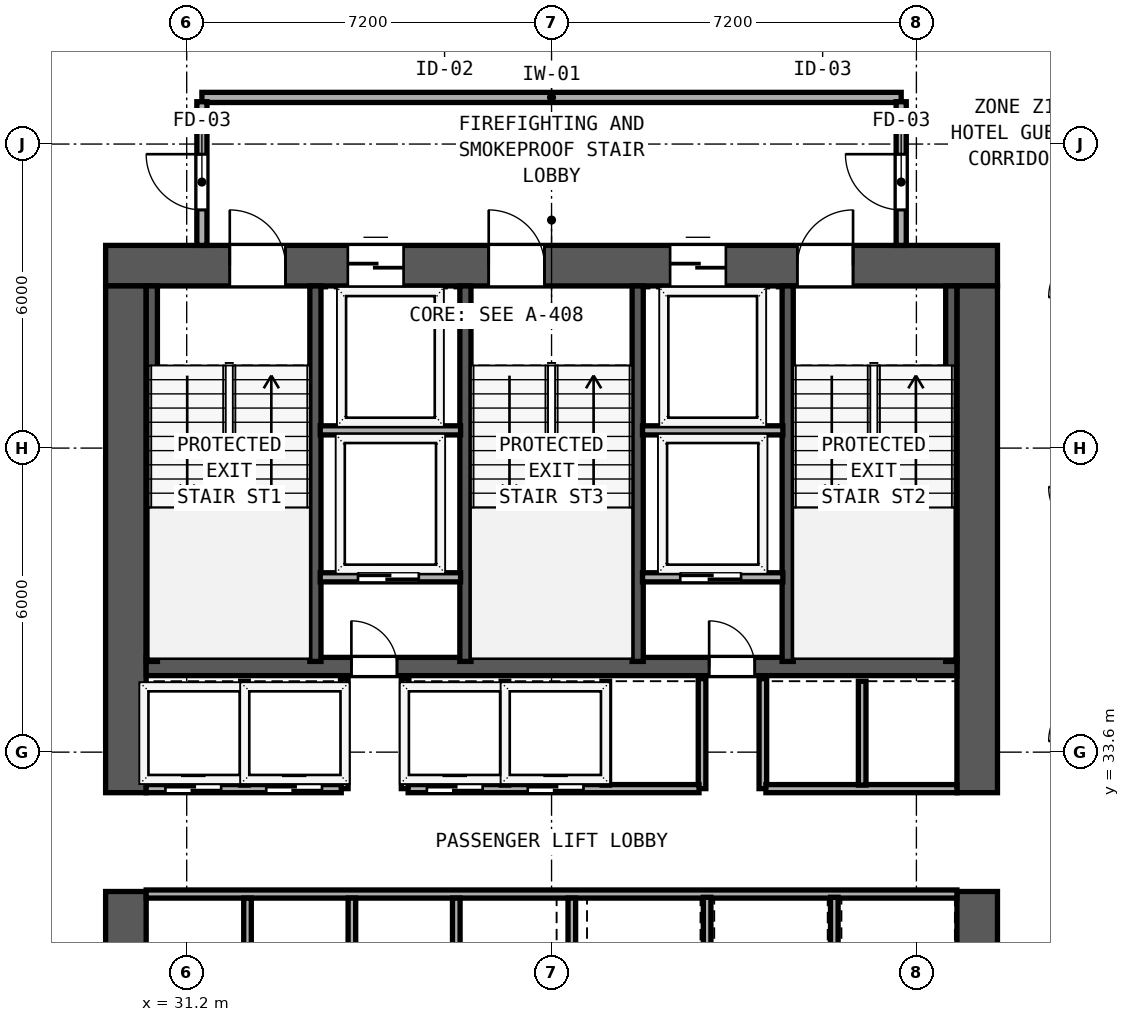
"""IFC4 building model, lengths in metres.
Left out: names, types, materials, properties, quantities, classifications, styles, units other than length and angle.
Written with IfcOpenShell. Run it as: python <this file> out.ifc"""

import sys

from ifc_helpers import new_model, si_unit, direction, frame, frame_2d, origin, place, context, subcontext, project, spatial, rectangle, extrude, element, fill, save


model = new_model("IFC4")
c1 = context("Model", 3, precision=1e-05, world=origin(), true_north=direction((0.0, 1.0)))
c2 = subcontext(c1, "Body", "Model", "MODEL_VIEW")
j1 = project(units=[si_unit("LENGTHUNIT", "METRE"), si_unit("PLANEANGLEUNIT", "RADIAN")], contexts=[c1])
p1 = place(None, origin())
s1 = spatial("IfcSite", under=j1, at=p1, CompositionType="ELEMENT")
p2 = place(p1, origin())
s2 = spatial("IfcBuilding", under=s1, at=p2, CompositionType="ELEMENT")
p3 = place(p2, frame((0.0, 0.0, 81.8)))
s3 = spatial("IfcBuildingStorey", under=s2, at=p3, CompositionType="ELEMENT", Elevation=81.8)
p4 = place(p3, frame((29.6, 43.2, 0.0), z_axis=(0.0, 0.0, 1.0), x_axis=(1.0, 0.0, 0.0)))
e1 = element("IfcWall", 1, at=p4, inside=s3, PredefinedType="SHEAR", context=c2, shape_type="SweptSolid", body=[
    extrude(rectangle(XDim=17.6, YDim=0.8, at=frame_2d((8.8, 0.0))), origin(), (0.0, 0.0, 1.0), 3.6),
])
p5 = place(p4, frame((2.45, 0.0, 0.0)))
e2 = element("IfcOpeningElement", 2, at=p5, cuts=e1, PredefinedType="OPENING", context=c2, shape_type="SweptSolid", body=[
    extrude(rectangle(XDim=1.1, YDim=2.15, at=frame_2d((0.55, 1.075))), frame((0.0, 0.41, 0.0), z_axis=(0.0, -1.0, 0.0), x_axis=(1.0, 0.0, 0.0)), (0.0, 0.0, 1.0), 0.82),
])
p6 = place(p4, frame((7.56, 0.0, 0.0)))
e3 = element("IfcOpeningElement", 3, at=p6, cuts=e1, PredefinedType="OPENING", context=c2, shape_type="SweptSolid", body=[
    extrude(rectangle(XDim=1.1, YDim=2.15, at=frame_2d((0.55, 1.075))), frame((0.0, 0.41, 0.0), z_axis=(0.0, -1.0, 0.0), x_axis=(1.0, 0.0, 0.0)), (0.0, 0.0, 1.0), 0.82),
])
p7 = place(p4, frame((13.65, 0.0, 0.0)))
e4 = element("IfcOpeningElement", 4, at=p7, cuts=e1, PredefinedType="OPENING", context=c2, shape_type="SweptSolid", body=[
    extrude(rectangle(XDim=1.1, YDim=2.15, at=frame_2d((0.55, 1.075))), frame((0.0, 0.41, 0.0), z_axis=(0.0, -1.0, 0.0), x_axis=(1.0, 0.0, 0.0)), (0.0, 0.0, 1.0), 0.82),
])
p8 = place(p4, frame((4.78, 0.0, 0.0)))
e5 = element("IfcOpeningElement", 5, at=p8, cuts=e1, PredefinedType="OPENING", context=c2, shape_type="SweptSolid", body=[
    extrude(rectangle(XDim=1.1, YDim=2.2, at=frame_2d((0.55, 1.1))), frame((0.0, 0.41, 0.0), z_axis=(0.0, -1.0, 0.0), x_axis=(1.0, 0.0, 0.0)), (0.0, 0.0, 1.0), 0.82),
])
p9 = place(p4, frame((11.14, 0.0, 0.0)))
e6 = element("IfcOpeningElement", 6, at=p9, cuts=e1, PredefinedType="OPENING", context=c2, shape_type="SweptSolid", body=[
    extrude(rectangle(XDim=1.1, YDim=2.2, at=frame_2d((0.55, 1.1))), frame((0.0, 0.41, 0.0), z_axis=(0.0, -1.0, 0.0), x_axis=(1.0, 0.0, 0.0)), (0.0, 0.0, 1.0), 0.82),
])
p10 = place(p3, frame((30.0, 26.8, 0.0), z_axis=(0.0, 0.0, 1.0), x_axis=(0.0, 1.0, 0.0)))
e7 = element("IfcWall", 7, at=p10, inside=s3, PredefinedType="SHEAR", context=c2, shape_type="SweptSolid", body=[
    extrude(rectangle(XDim=4.05, YDim=0.8, at=frame_2d((2.025, 0.0))), origin(), (0.0, 0.0, 1.0), 3.6),
])
p11 = place(p3, frame((30.0, 32.8, 0.0), z_axis=(0.0, 0.0, 1.0), x_axis=(0.0, 1.0, 0.0)))
e8 = element("IfcWall", 8, at=p11, inside=s3, PredefinedType="SHEAR", context=c2, shape_type="SweptSolid", body=[
    extrude(rectangle(XDim=10.0, YDim=0.8, at=frame_2d((5.0, 0.0))), origin(), (0.0, 0.0, 1.0), 3.6),
])
p12 = place(p3, frame((46.8, 26.8, 0.0), z_axis=(0.0, 0.0, 1.0), x_axis=(0.0, 1.0, 0.0)))
e9 = element("IfcWall", 9, at=p12, inside=s3, PredefinedType="SHEAR", context=c2, shape_type="SweptSolid", body=[
    extrude(rectangle(XDim=4.05, YDim=0.8, at=frame_2d((2.025, 0.0))), origin(), (0.0, 0.0, 1.0), 3.6),
])
p13 = place(p3, frame((46.8, 32.8, 0.0), z_axis=(0.0, 0.0, 1.0), x_axis=(0.0, 1.0, 0.0)))
e10 = element("IfcWall", 10, at=p13, inside=s3, PredefinedType="SHEAR", context=c2, shape_type="SweptSolid", body=[
    extrude(rectangle(XDim=10.0, YDim=0.8, at=frame_2d((5.0, 0.0))), origin(), (0.0, 0.0, 1.0), 3.6),
])
p14 = place(p3, frame((30.4, 35.29, 0.0), z_axis=(0.0, 0.0, 1.0), x_axis=(1.0, 0.0, 0.0)))
e11 = element("IfcWall", 11, at=p14, inside=s3, PredefinedType="SHEAR", context=c2, shape_type="SweptSolid", body=[
    extrude(rectangle(XDim=16.0, YDim=0.36, at=frame_2d((8.0, 0.0))), origin(), (0.0, 0.0, 1.0), 3.6),
])
p15 = place(p14, frame((4.95, 0.0, 0.0), z_axis=(0.0, 0.0, 1.0), x_axis=(-1.0, 0.0, 0.0)))
e12 = element("IfcOpeningElement", 12, at=p15, cuts=e11, PredefinedType="OPENING", context=c2, shape_type="SweptSolid", body=[
    extrude(rectangle(XDim=0.9, YDim=2.1, at=frame_2d((0.45, 1.05))), frame((0.0, 0.19, 0.0), z_axis=(0.0, -1.0, 0.0), x_axis=(1.0, 0.0, 0.0)), (0.0, 0.0, 1.0), 0.38),
])
p16 = place(p14, frame((12.01, 0.0, 0.0), z_axis=(0.0, 0.0, 1.0), x_axis=(-1.0, 0.0, 0.0)))
e13 = element("IfcOpeningElement", 13, at=p16, cuts=e11, PredefinedType="OPENING", context=c2, shape_type="SweptSolid", body=[
    extrude(rectangle(XDim=0.9, YDim=2.1, at=frame_2d((0.45, 1.05))), frame((0.0, 0.19, 0.0), z_axis=(0.0, -1.0, 0.0), x_axis=(1.0, 0.0, 0.0)), (0.0, 0.0, 1.0), 0.38),
])
for number, where, z_axis, x_axis in (
    (14, (30.512, 35.39, 0.0), (0.0, 0.0, 1.0), (0.0, 1.0, 0.0)),
    (15, (33.74, 35.39, 0.0), (0.0, 0.0, 1.0), (0.0, 1.0, 0.0)),
    (16, (36.7, 35.39, 0.0), (0.0, 0.0, 1.0), (0.0, 1.0, 0.0)),
    (17, (40.1, 35.39, 0.0), (0.0, 0.0, 1.0), (0.0, 1.0, 0.0)),
    (18, (43.06, 35.39, 0.0), (0.0, 0.0, 1.0), (0.0, 1.0, 0.0)),
    (19, (46.288, 35.39, 0.0), (0.0, 0.0, 1.0), (0.0, 1.0, 0.0)),
):
    element("IfcWall", number, at=place(p3, frame(where, z_axis=z_axis, x_axis=x_axis)), inside=s3, PredefinedType="SHEAR", context=c2, shape_type="SweptSolid", body=[
        extrude(rectangle(XDim=7.41, YDim=0.22, at=frame_2d((3.705, 0.0))), origin(), (0.0, 0.0, 1.0), 3.6),
    ])
p17 = place(p3, frame((31.5, 46.52, 0.0), z_axis=(0.0, 0.0, 1.0), x_axis=(1.0, 0.0, 0.0)))
e20 = element("IfcWall", 20, at=p17, inside=s3, PredefinedType="SOLIDWALL", context=c2, shape_type="SweptSolid", body=[
    extrude(rectangle(XDim=13.8, YDim=0.2, at=frame_2d((6.9, 0.0))), origin(), (0.0, 0.0, 1.0), 3.6),
])
p18 = place(p3, frame((31.5, 43.6, 0.0), z_axis=(0.0, 0.0, 1.0), x_axis=(0.0, 1.0, 0.0)))
e21 = element("IfcWall", 21, at=p18, inside=s3, PredefinedType="SOLIDWALL", context=c2, shape_type="SweptSolid", body=[
    extrude(rectangle(XDim=2.835, YDim=0.2, at=frame_2d((1.417, 0.0))), origin(), (0.0, 0.0, 1.0), 3.6),
])
p19 = place(p18, frame((1.8, 0.0, 0.0), z_axis=(0.0, 0.0, 1.0), x_axis=(-1.0, 0.0, 0.0)))
e22 = element("IfcOpeningElement", 22, at=p19, cuts=e21, PredefinedType="OPENING", context=c2, shape_type="SweptSolid", body=[
    extrude(rectangle(XDim=1.1, YDim=2.15, at=frame_2d((0.55, 1.075))), frame((0.0, 0.11, 0.0), z_axis=(0.0, -1.0, 0.0), x_axis=(1.0, 0.0, 0.0)), (0.0, 0.0, 1.0), 0.22),
])
p20 = place(p3, frame((45.3, 43.6, 0.0), z_axis=(0.0, 0.0, 1.0), x_axis=(0.0, 1.0, 0.0)))
e23 = element("IfcWall", 23, at=p20, inside=s3, PredefinedType="SOLIDWALL", context=c2, shape_type="SweptSolid", body=[
    extrude(rectangle(XDim=2.835, YDim=0.2, at=frame_2d((1.417, 0.0))), origin(), (0.0, 0.0, 1.0), 3.6),
])
p21 = place(p20, frame((0.7, 0.0, 0.0)))
e24 = element("IfcOpeningElement", 24, at=p21, cuts=e23, PredefinedType="OPENING", context=c2, shape_type="SweptSolid", body=[
    extrude(rectangle(XDim=1.1, YDim=2.15, at=frame_2d((0.55, 1.075))), frame((0.0, 0.11, 0.0), z_axis=(0.0, -1.0, 0.0), x_axis=(1.0, 0.0, 0.0)), (0.0, 0.0, 1.0), 0.22),
])
for number, where, z_axis, x_axis in (
    (25, (33.835, 39.95, 0.0), (0.0, 0.0, 1.0), (1.0, 0.0, 0.0)),
    (26, (40.195, 39.95, 0.0), (0.0, 0.0, 1.0), (1.0, 0.0, 0.0)),
):
    element("IfcWall", number, at=place(p3, frame(where, z_axis=z_axis, x_axis=x_axis)), inside=s3, PredefinedType="SOLIDWALL", context=c2, shape_type="SweptSolid", body=[
        extrude(rectangle(XDim=2.77, YDim=0.18, at=frame_2d((1.385, 0.0))), origin(), (0.0, 0.0, 1.0), 3.6),
    ])
p22 = place(p3, frame((33.835, 37.05, 0.0), z_axis=(0.0, 0.0, 1.0), x_axis=(1.0, 0.0, 0.0)))
e27 = element("IfcWall", 27, at=p22, inside=s3, PredefinedType="SOLIDWALL", context=c2, shape_type="SweptSolid", body=[
    extrude(rectangle(XDim=2.77, YDim=0.18, at=frame_2d((1.385, 0.0))), origin(), (0.0, 0.0, 1.0), 3.6),
])
p23 = place(p22, frame((1.945, 0.0, 0.0), z_axis=(0.0, 0.0, 1.0), x_axis=(-1.0, 0.0, 0.0)))
e28 = element("IfcOpeningElement", 28, at=p23, cuts=e27, PredefinedType="OPENING", context=c2, shape_type="SweptSolid", body=[
    extrude(rectangle(XDim=1.2, YDim=2.2, at=frame_2d((0.6, 1.1))), frame((0.0, 0.1, 0.0), z_axis=(0.0, -1.0, 0.0), x_axis=(1.0, 0.0, 0.0)), (0.0, 0.0, 1.0), 0.2),
])
for number, where, z_axis, x_axis in (
    (29, (34.31, 32.88, 0.0), (0.0, 0.0, 1.0), (0.0, 1.0, 0.0)),
    (30, (35.51, 32.88, 0.0), (0.0, 0.0, 1.0), (0.0, 1.0, 0.0)),
):
    element("IfcWall", number, at=place(p3, frame(where, z_axis=z_axis, x_axis=x_axis)), inside=s3, PredefinedType="SOLIDWALL", context=c2, shape_type="SweptSolid", body=[
        extrude(rectangle(XDim=2.17, YDim=0.15, at=frame_2d((1.085, 0.0))), origin(), (0.0, 0.0, 1.0), 3.6),
    ])
p24 = place(p3, frame((40.195, 37.05, 0.0), z_axis=(0.0, 0.0, 1.0), x_axis=(1.0, 0.0, 0.0)))
e31 = element("IfcWall", 31, at=p24, inside=s3, PredefinedType="SOLIDWALL", context=c2, shape_type="SweptSolid", body=[
    extrude(rectangle(XDim=2.77, YDim=0.18, at=frame_2d((1.385, 0.0))), origin(), (0.0, 0.0, 1.0), 3.6),
])
p25 = place(p24, frame((1.945, 0.0, 0.0), z_axis=(0.0, 0.0, 1.0), x_axis=(-1.0, 0.0, 0.0)))
e32 = element("IfcOpeningElement", 32, at=p25, cuts=e31, PredefinedType="OPENING", context=c2, shape_type="SweptSolid", body=[
    extrude(rectangle(XDim=1.2, YDim=2.2, at=frame_2d((0.6, 1.1))), frame((0.0, 0.1, 0.0), z_axis=(0.0, -1.0, 0.0), x_axis=(1.0, 0.0, 0.0)), (0.0, 0.0, 1.0), 0.2),
])
for number, where, z_axis, x_axis in (
    (33, (41.37, 32.88, 0.0), (0.0, 0.0, 1.0), (0.0, 1.0, 0.0)),
    (34, (42.57, 32.88, 0.0), (0.0, 0.0, 1.0), (0.0, 1.0, 0.0)),
):
    element("IfcWall", number, at=place(p3, frame(where, z_axis=z_axis, x_axis=x_axis)), inside=s3, PredefinedType="SOLIDWALL", context=c2, shape_type="SweptSolid", body=[
        extrude(rectangle(XDim=2.17, YDim=0.15, at=frame_2d((1.085, 0.0))), origin(), (0.0, 0.0, 1.0), 3.6),
    ])
p26 = place(p3, frame((30.4, 32.88, 0.0), z_axis=(0.0, 0.0, 1.0), x_axis=(1.0, 0.0, 0.0)))
e35 = element("IfcWall", 35, at=p26, inside=s3, PredefinedType="SOLIDWALL", context=c2, shape_type="SweptSolid", body=[
    extrude(rectangle(XDim=3.85, YDim=0.16, at=frame_2d((1.925, 0.0))), origin(), (0.0, 0.0, 1.0), 3.6),
])
p27 = place(p26, frame((1.48, 0.0, 0.0), z_axis=(0.0, 0.0, 1.0), x_axis=(-1.0, 0.0, 0.0)))
e36 = element("IfcOpeningElement", 36, at=p27, cuts=e35, PredefinedType="OPENING", context=c2, shape_type="SweptSolid", body=[
    extrude(rectangle(XDim=1.1, YDim=2.2, at=frame_2d((0.55, 1.1))), frame((0.0, 0.09, 0.0), z_axis=(0.0, -1.0, 0.0), x_axis=(1.0, 0.0, 0.0)), (0.0, 0.0, 1.0), 0.18),
])
p28 = place(p26, frame((3.47, 0.0, 0.0), z_axis=(0.0, 0.0, 1.0), x_axis=(-1.0, 0.0, 0.0)))
e37 = element("IfcOpeningElement", 37, at=p28, cuts=e35, PredefinedType="OPENING", context=c2, shape_type="SweptSolid", body=[
    extrude(rectangle(XDim=1.1, YDim=2.2, at=frame_2d((0.55, 1.1))), frame((0.0, 0.09, 0.0), z_axis=(0.0, -1.0, 0.0), x_axis=(1.0, 0.0, 0.0)), (0.0, 0.0, 1.0), 0.18),
])
p29 = place(p3, frame((35.57, 32.88, 0.0), z_axis=(0.0, 0.0, 1.0), x_axis=(1.0, 0.0, 0.0)))
e38 = element("IfcWall", 38, at=p29, inside=s3, PredefinedType="SOLIDWALL", context=c2, shape_type="SweptSolid", body=[
    extrude(rectangle(XDim=5.74, YDim=0.16, at=frame_2d((2.87, 0.0))), origin(), (0.0, 0.0, 1.0), 3.6),
])
p30 = place(p29, frame((1.47, 0.0, 0.0), z_axis=(0.0, 0.0, 1.0), x_axis=(-1.0, 0.0, 0.0)))
e39 = element("IfcOpeningElement", 39, at=p30, cuts=e38, PredefinedType="OPENING", context=c2, shape_type="SweptSolid", body=[
    extrude(rectangle(XDim=1.1, YDim=2.2, at=frame_2d((0.55, 1.1))), frame((0.0, 0.09, 0.0), z_axis=(0.0, -1.0, 0.0), x_axis=(1.0, 0.0, 0.0)), (0.0, 0.0, 1.0), 0.18),
])
p31 = place(p29, frame((3.46, 0.0, 0.0), z_axis=(0.0, 0.0, 1.0), x_axis=(-1.0, 0.0, 0.0)))
e40 = element("IfcOpeningElement", 40, at=p31, cuts=e38, PredefinedType="OPENING", context=c2, shape_type="SweptSolid", body=[
    extrude(rectangle(XDim=1.1, YDim=2.2, at=frame_2d((0.55, 1.1))), frame((0.0, 0.09, 0.0), z_axis=(0.0, -1.0, 0.0), x_axis=(1.0, 0.0, 0.0)), (0.0, 0.0, 1.0), 0.18),
])
p32 = place(p3, frame((42.63, 32.88, 0.0), z_axis=(0.0, 0.0, 1.0), x_axis=(1.0, 0.0, 0.0)))
e41 = element("IfcWall", 41, at=p32, inside=s3, PredefinedType="SOLIDWALL", context=c2, shape_type="SweptSolid", body=[
    extrude(rectangle(XDim=3.77, YDim=0.16, at=frame_2d((1.885, 0.0))), origin(), (0.0, 0.0, 1.0), 3.6),
])
for number, where, z_axis, x_axis in (
    (42, (32.34, 32.95, 0.0), (0.0, 0.0, 1.0), (0.0, 1.0, 0.0)),
    (43, (37.48, 32.95, 0.0), (0.0, 0.0, 1.0), (0.0, 1.0, 0.0)),
    (44, (39.47, 32.95, 0.0), (0.0, 0.0, 1.0), (0.0, 1.0, 0.0)),
    (45, (44.53, 32.95, 0.0), (0.0, 0.0, 1.0), (0.0, 1.0, 0.0)),
):
    element("IfcWall", number, at=place(p3, frame(where, z_axis=z_axis, x_axis=x_axis)), inside=s3, PredefinedType="SOLIDWALL", context=c2, shape_type="SweptSolid", body=[
        extrude(rectangle(XDim=2.05, YDim=0.15, at=frame_2d((1.025, 0.0))), origin(), (0.0, 0.0, 1.0), 3.6),
    ])
p33 = place(p3, frame((30.4, 30.8, 0.0), z_axis=(0.0, 0.0, 1.0), x_axis=(1.0, 0.0, 0.0)))
e46 = element("IfcWall", 46, at=p33, inside=s3, PredefinedType="SOLIDWALL", context=c2, shape_type="SweptSolid", body=[
    extrude(rectangle(XDim=16.0, YDim=0.16, at=frame_2d((8.0, 0.0))), origin(), (0.0, 0.0, 1.0), 3.6),
])
for number, where, z_axis, x_axis in (
    (47, (32.4, 28.735, 0.0), (0.0, 0.0, 1.0), (0.0, 1.0, 0.0)),
    (48, (34.46, 28.735, 0.0), (0.0, 0.0, 1.0), (0.0, 1.0, 0.0)),
    (49, (36.52, 28.735, 0.0), (0.0, 0.0, 1.0), (0.0, 1.0, 0.0)),
    (50, (38.8, 28.735, 0.0), (0.0, 0.0, 1.0), (0.0, 1.0, 0.0)),
):
    element("IfcWall", number, at=place(p3, frame(where, z_axis=z_axis, x_axis=x_axis)), inside=s3, PredefinedType="SOLIDWALL", context=c2, shape_type="SweptSolid", body=[
        extrude(rectangle(XDim=1.985, YDim=0.15, at=frame_2d((0.992, 0.0))), origin(), (0.0, 0.0, 1.0), 3.6),
    ])
for number, where, z_axis, x_axis in (
    (51, (41.47, 28.75, 0.0), (0.0, 0.0, 1.0), (0.0, 1.0, 0.0)),
    (52, (43.98, 28.75, 0.0), (0.0, 0.0, 1.0), (0.0, 1.0, 0.0)),
):
    element("IfcWall", number, at=place(p3, frame(where, z_axis=z_axis, x_axis=x_axis)), inside=s3, PredefinedType="SOLIDWALL", context=c2, shape_type="SweptSolid", body=[
        extrude(rectangle(XDim=1.985, YDim=0.15, at=frame_2d((0.993, 0.0))), origin(), (0.0, 0.0, 1.0), 3.6),
    ])
p34 = place(p5, origin())
e53 = element("IfcDoor", 53, at=p34, inside=s3, OperationType="SINGLE_SWING_LEFT", PredefinedType="DOOR", context=c2, shape_type="SweptSolid", body=[
    extrude(rectangle(XDim=1.1, YDim=2.15, at=frame_2d((0.55, 1.075))), frame((0.0, 0.185, 0.0), z_axis=(0.0, -1.0, 0.0), x_axis=(1.0, 0.0, 0.0)), (0.0, 0.0, 1.0), 0.05),
])
fill(e2, e53)
p35 = place(p6, origin())
e54 = element("IfcDoor", 54, at=p35, inside=s3, OperationType="SINGLE_SWING_LEFT", PredefinedType="DOOR", context=c2, shape_type="SweptSolid", body=[
    extrude(rectangle(XDim=1.1, YDim=2.15, at=frame_2d((0.55, 1.075))), frame((0.0, 0.185, 0.0), z_axis=(0.0, -1.0, 0.0), x_axis=(1.0, 0.0, 0.0)), (0.0, 0.0, 1.0), 0.05),
])
fill(e3, e54)
p36 = place(p7, origin())
e55 = element("IfcDoor", 55, at=p36, inside=s3, OperationType="SINGLE_SWING_RIGHT", PredefinedType="DOOR", context=c2, shape_type="SweptSolid", body=[
    extrude(rectangle(XDim=1.1, YDim=2.15, at=frame_2d((0.55, 1.075))), frame((0.0, 0.185, 0.0), z_axis=(0.0, -1.0, 0.0), x_axis=(1.0, 0.0, 0.0)), (0.0, 0.0, 1.0), 0.05),
])
fill(e4, e55)
p37 = place(p19, origin())
e56 = element("IfcDoor", 56, at=p37, inside=s3, OperationType="SINGLE_SWING_LEFT", PredefinedType="DOOR", context=c2, shape_type="SweptSolid", body=[
    extrude(rectangle(XDim=1.1, YDim=2.15, at=frame_2d((0.55, 1.075))), frame((0.0, 0.025, 0.0), z_axis=(0.0, -1.0, 0.0), x_axis=(1.0, 0.0, 0.0)), (0.0, 0.0, 1.0), 0.05),
])
fill(e22, e56)
p38 = place(p21, origin())
e57 = element("IfcDoor", 57, at=p38, inside=s3, OperationType="SINGLE_SWING_RIGHT", PredefinedType="DOOR", context=c2, shape_type="SweptSolid", body=[
    extrude(rectangle(XDim=1.1, YDim=2.15, at=frame_2d((0.55, 1.075))), frame((0.0, 0.025, 0.0), z_axis=(0.0, -1.0, 0.0), x_axis=(1.0, 0.0, 0.0)), (0.0, 0.0, 1.0), 0.05),
])
fill(e24, e57)
p39 = place(p8, origin())
e58 = element("IfcDoor", 58, at=p39, inside=s3, OperationType="SLIDING_TO_LEFT", PredefinedType="DOOR", context=c2, shape_type="SweptSolid", body=[
    extrude(rectangle(XDim=1.1, YDim=2.2, at=frame_2d((0.55, 1.1))), frame((0.0, 0.185, 0.0), z_axis=(0.0, -1.0, 0.0), x_axis=(1.0, 0.0, 0.0)), (0.0, 0.0, 1.0), 0.05),
])
fill(e5, e58)
p40 = place(p9, origin())
e59 = element("IfcDoor", 59, at=p40, inside=s3, OperationType="SLIDING_TO_LEFT", PredefinedType="DOOR", context=c2, shape_type="SweptSolid", body=[
    extrude(rectangle(XDim=1.1, YDim=2.2, at=frame_2d((0.55, 1.1))), frame((0.0, 0.185, 0.0), z_axis=(0.0, -1.0, 0.0), x_axis=(1.0, 0.0, 0.0)), (0.0, 0.0, 1.0), 0.05),
])
fill(e6, e59)
p41 = place(p23, origin())
e60 = element("IfcDoor", 60, at=p41, inside=s3, OperationType="SLIDING_TO_RIGHT", PredefinedType="DOOR", context=c2, shape_type="SweptSolid", body=[
    extrude(rectangle(XDim=1.2, YDim=2.2, at=frame_2d((0.6, 1.1))), frame((0.0, 0.025, 0.0), z_axis=(0.0, -1.0, 0.0), x_axis=(1.0, 0.0, 0.0)), (0.0, 0.0, 1.0), 0.05),
])
fill(e28, e60)
p42 = place(p15, origin())
e61 = element("IfcDoor", 61, at=p42, inside=s3, OperationType="SINGLE_SWING_RIGHT", PredefinedType="DOOR", context=c2, shape_type="SweptSolid", body=[
    extrude(rectangle(XDim=0.9, YDim=2.1, at=frame_2d((0.45, 1.05))), frame((0.0, 0.025, 0.0), z_axis=(0.0, -1.0, 0.0), x_axis=(1.0, 0.0, 0.0)), (0.0, 0.0, 1.0), 0.05),
])
fill(e12, e61)
p43 = place(p25, origin())
e62 = element("IfcDoor", 62, at=p43, inside=s3, OperationType="SLIDING_TO_RIGHT", PredefinedType="DOOR", context=c2, shape_type="SweptSolid", body=[
    extrude(rectangle(XDim=1.2, YDim=2.2, at=frame_2d((0.6, 1.1))), frame((0.0, 0.025, 0.0), z_axis=(0.0, -1.0, 0.0), x_axis=(1.0, 0.0, 0.0)), (0.0, 0.0, 1.0), 0.05),
])
fill(e32, e62)
p44 = place(p16, origin())
e63 = element("IfcDoor", 63, at=p44, inside=s3, OperationType="SINGLE_SWING_RIGHT", PredefinedType="DOOR", context=c2, shape_type="SweptSolid", body=[
    extrude(rectangle(XDim=0.9, YDim=2.1, at=frame_2d((0.45, 1.05))), frame((0.0, 0.025, 0.0), z_axis=(0.0, -1.0, 0.0), x_axis=(1.0, 0.0, 0.0)), (0.0, 0.0, 1.0), 0.05),
])
fill(e13, e63)
p45 = place(p27, origin())
e64 = element("IfcDoor", 64, at=p45, inside=s3, OperationType="SLIDING_TO_LEFT", PredefinedType="DOOR", context=c2, shape_type="SweptSolid", body=[
    extrude(rectangle(XDim=1.1, YDim=2.2, at=frame_2d((0.55, 1.1))), frame((0.0, 0.025, 0.0), z_axis=(0.0, -1.0, 0.0), x_axis=(1.0, 0.0, 0.0)), (0.0, 0.0, 1.0), 0.05),
])
fill(e36, e64)
p46 = place(p28, origin())
e65 = element("IfcDoor", 65, at=p46, inside=s3, OperationType="SLIDING_TO_LEFT", PredefinedType="DOOR", context=c2, shape_type="SweptSolid", body=[
    extrude(rectangle(XDim=1.1, YDim=2.2, at=frame_2d((0.55, 1.1))), frame((0.0, 0.025, 0.0), z_axis=(0.0, -1.0, 0.0), x_axis=(1.0, 0.0, 0.0)), (0.0, 0.0, 1.0), 0.05),
])
fill(e37, e65)
p47 = place(p30, origin())
e66 = element("IfcDoor", 66, at=p47, inside=s3, OperationType="SLIDING_TO_LEFT", PredefinedType="DOOR", context=c2, shape_type="SweptSolid", body=[
    extrude(rectangle(XDim=1.1, YDim=2.2, at=frame_2d((0.55, 1.1))), frame((0.0, 0.025, 0.0), z_axis=(0.0, -1.0, 0.0), x_axis=(1.0, 0.0, 0.0)), (0.0, 0.0, 1.0), 0.05),
])
fill(e39, e66)
p48 = place(p31, origin())
e67 = element("IfcDoor", 67, at=p48, inside=s3, OperationType="SLIDING_TO_LEFT", PredefinedType="DOOR", context=c2, shape_type="SweptSolid", body=[
    extrude(rectangle(XDim=1.1, YDim=2.2, at=frame_2d((0.55, 1.1))), frame((0.0, 0.025, 0.0), z_axis=(0.0, -1.0, 0.0), x_axis=(1.0, 0.0, 0.0)), (0.0, 0.0, 1.0), 0.05),
])
fill(e40, e67)
save(model, sys.argv[1])
